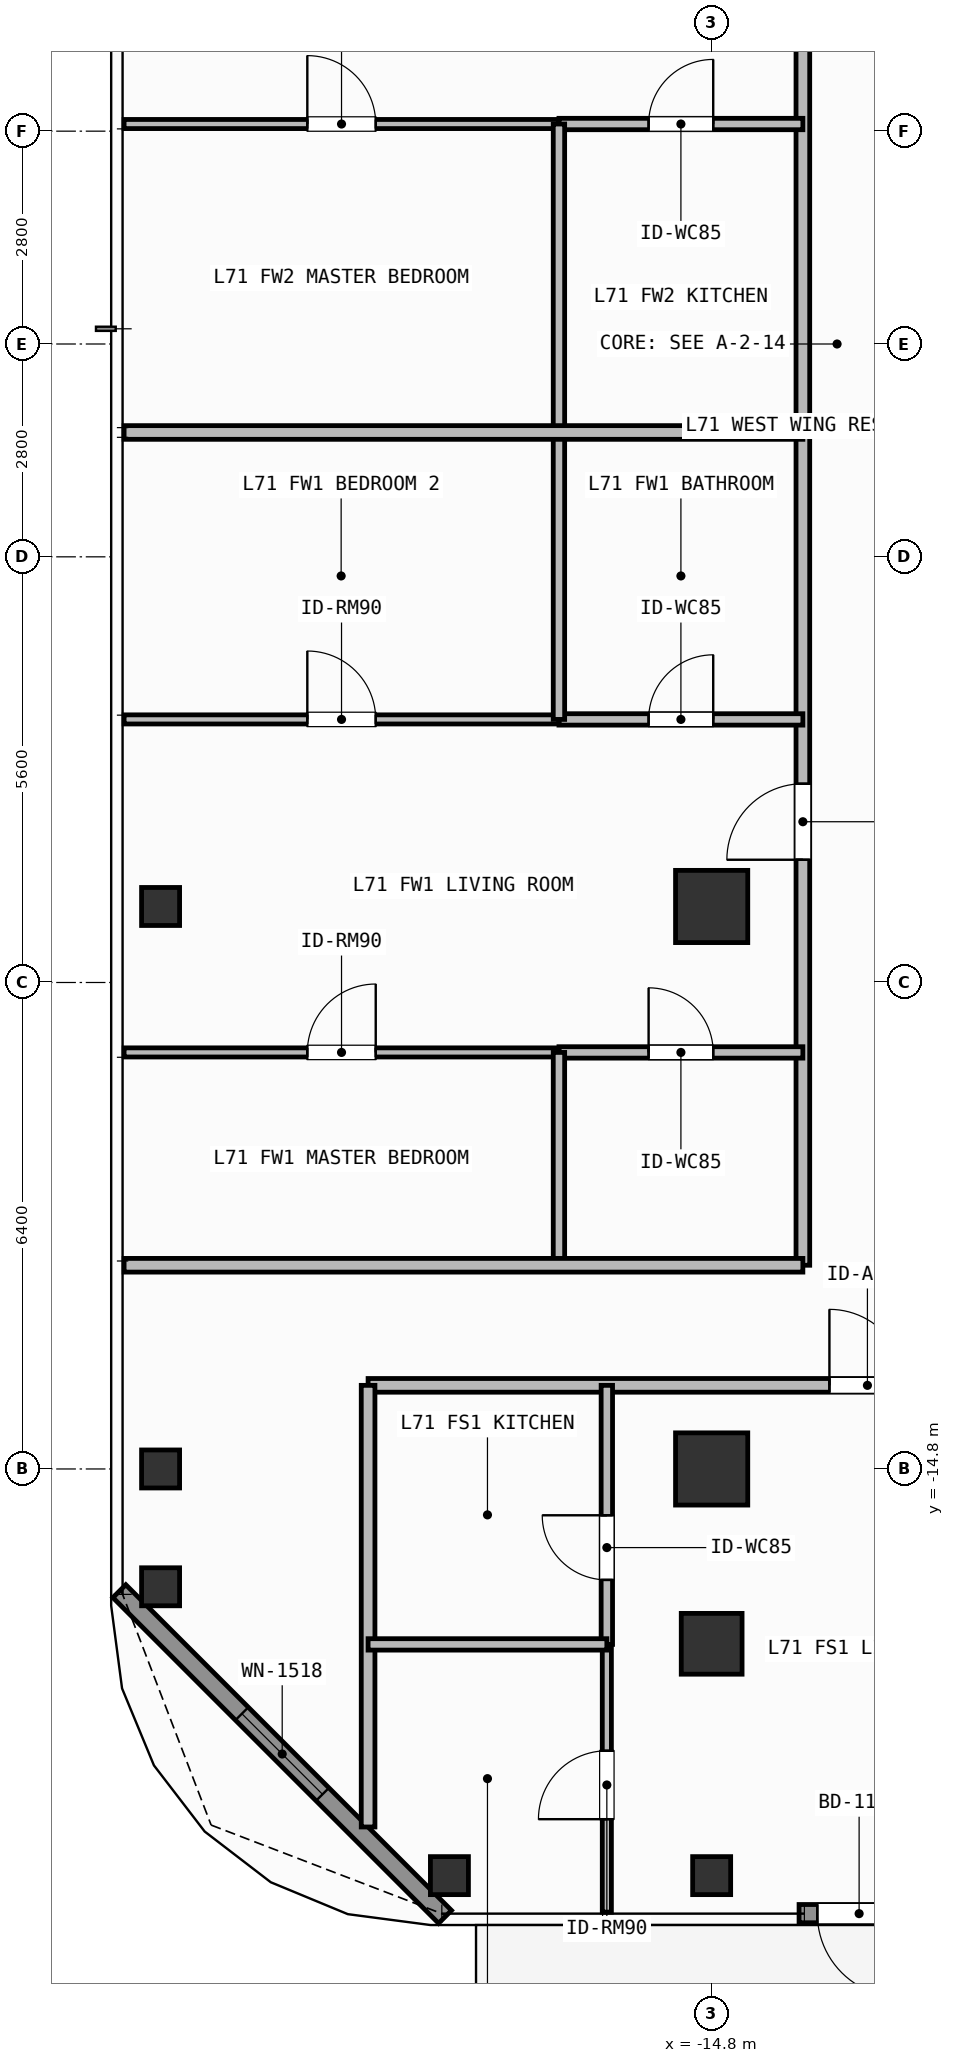
"""IFC4 building model, lengths in metres.
Left out: names, types, materials, properties, quantities, classifications, styles, units other than length and angle.
Written with IfcOpenShell. Run it as: python <this file> out.ifc"""

import sys

from ifc_helpers import new_model, si_unit, direction, frame, frame_2d, origin, origin_2d, place, context, subcontext, project, spatial, rectangle, hollow_rectangle, extrude, element, fill, save


model = new_model("IFC4")
c1 = context("Model", 3, precision=1e-05, world=origin(), true_north=direction((0.0, 1.0)))
c2 = subcontext(c1, "Body", "Model", "MODEL_VIEW")
j1 = project(units=[si_unit("LENGTHUNIT", "METRE"), si_unit("PLANEANGLEUNIT", "RADIAN")], contexts=[c1])
p1 = place(None, origin())
s1 = spatial("IfcSite", under=j1, at=p1, CompositionType="ELEMENT")
p2 = place(p1, origin())
s2 = spatial("IfcBuilding", under=s1, at=p2, CompositionType="ELEMENT")
p3 = place(p2, frame((0.0, 0.0, 289.8)))
s3 = spatial("IfcBuildingStorey", under=s2, at=p3, CompositionType="ELEMENT", Elevation=289.8)
for number, where, z_axis, x_axis in (
    (1, (-14.8, -14.8, 0.0), (0.0, 0.0, 1.0), (1.0, 0.0, 0.0)),
    (2, (-14.8, -7.4, 0.0), (0.0, 0.0, 1.0), (1.0, 0.0, 0.0)),
):
    element("IfcColumn", number, at=place(p3, frame(where, z_axis=z_axis, x_axis=x_axis)), inside=s3, PredefinedType="COLUMN", context=c2, shape_type="SweptSolid", body=[
        extrude(rectangle(XDim=0.95, YDim=0.95, at=origin_2d()), origin(), (0.0, 0.0, 1.0), 3.9),
    ])
p4 = place(p3, frame((-14.8, -17.1, 0.0), z_axis=(0.0, 0.0, 1.0), x_axis=(1.0, 0.0, 0.0)))
e3 = element("IfcColumn", 3, at=p4, inside=s3, PredefinedType="COLUMN", context=c2, shape_type="SweptSolid", body=[
    extrude(hollow_rectangle(XDim=0.8, YDim=0.8, WallThickness=0.036, at=origin_2d()), origin(), (0.0, 0.0, 1.0), 3.9),
])
for number, where, z_axis, x_axis in (
    (4, (-18.25, -20.15, 0.0), (0.0, 0.0, 1.0), (1.0, 0.0, 0.0)),
    (5, (-22.05, -16.35, 0.0), (0.0, 0.0, 1.0), (1.0, 0.0, 0.0)),
    (6, (-14.8, -20.15, 0.0), (0.0, 0.0, 1.0), (1.0, 0.0, 0.0)),
    (7, (-22.05, -14.8, 0.0), (0.0, 0.0, 1.0), (1.0, 0.0, 0.0)),
    (8, (-22.05, -7.4, 0.0), (0.0, 0.0, 1.0), (1.0, 0.0, 0.0)),
):
    element("IfcColumn", number, at=place(p3, frame(where, z_axis=z_axis, x_axis=x_axis)), inside=s3, PredefinedType="COLUMN", context=c2, shape_type="SweptSolid", body=[
        extrude(hollow_rectangle(XDim=0.5, YDim=0.5, WallThickness=0.025, at=origin_2d()), origin(), (0.0, 0.0, 1.0), 3.9),
    ])
p5 = place(p3, frame((-12.07, -20.65, 0.0), z_axis=(0.0, 0.0, 1.0), x_axis=(-1.0, 0.0, 0.0)))
e9 = element("IfcWall", 9, at=p5, inside=s3, PredefinedType="SOLIDWALL", context=c2, shape_type="SweptSolid", body=[
    extrude(rectangle(XDim=1.58, YDim=0.24, at=frame_2d((0.79, 0.0))), origin(), (0.0, 0.0, 1.0), 3.68),
])
p6 = place(p5, frame((0.24, 0.0, 0.0)))
e10 = element("IfcOpeningElement", 10, at=p6, cuts=e9, PredefinedType="OPENING", context=c2, shape_type="SweptSolid", body=[
    extrude(rectangle(XDim=1.1, YDim=2.2, at=frame_2d((0.55, 1.1))), frame((0.0, 0.13, 0.0), z_axis=(0.0, -1.0, 0.0), x_axis=(1.0, 0.0, 0.0)), (0.0, 0.0, 1.0), 0.26),
])
p7 = place(p3, frame((-18.308, -20.692, 0.0), z_axis=(0.0, 0.0, 1.0), x_axis=(-0.707106781187, 0.707106781187, 0.0)))
e11 = element("IfcWall", 11, at=p7, inside=s3, PredefinedType="SOLIDWALL", context=c2, shape_type="SweptSolid", body=[
    extrude(rectangle(XDim=6.059, YDim=0.24, at=frame_2d((3.03, 0.0))), origin(), (0.0, 0.0, 1.0), 3.68),
])
p8 = place(p7, frame((2.28, 0.0, 0.8)))
e12 = element("IfcOpeningElement", 12, at=p8, cuts=e11, PredefinedType="OPENING", context=c2, shape_type="SweptSolid", body=[
    extrude(rectangle(XDim=1.5, YDim=1.85, at=frame_2d((0.75, 0.925))), frame((0.0, 0.13, 0.0), z_axis=(0.0, -1.0, 0.0), x_axis=(1.0, 0.0, 0.0)), (0.0, 0.0, 1.0), 0.26),
])
p9 = place(p3, frame((-19.32, -13.7, 0.0), z_axis=(0.0, 0.0, 1.0), x_axis=(1.0, 0.0, 0.0)))
e13 = element("IfcWall", 13, at=p9, inside=s3, PredefinedType="PARTITIONING", context=c2, shape_type="SweptSolid", body=[
    extrude(rectangle(XDim=14.213, YDim=0.18, at=frame_2d((7.106, 0.0))), origin(), (0.0, 0.0, 1.0), 3.68),
])
p10 = place(p9, frame((6.069, 0.0, 0.0)))
e14 = element("IfcOpeningElement", 14, at=p10, cuts=e13, PredefinedType="OPENING", context=c2, shape_type="SweptSolid", body=[
    extrude(rectangle(XDim=1.0, YDim=2.2, at=frame_2d((0.5, 1.1))), frame((0.0, 0.1, 0.0), z_axis=(0.0, -1.0, 0.0), x_axis=(1.0, 0.0, 0.0)), (0.0, 0.0, 1.0), 0.2),
])
p11 = place(p3, frame((-16.179, -17.108, 0.0), z_axis=(0.0, 0.0, 1.0), x_axis=(0.0, 1.0, 0.0)))
e15 = element("IfcWall", 15, at=p11, inside=s3, PredefinedType="PARTITIONING", context=c2, shape_type="SweptSolid", body=[
    extrude(rectangle(XDim=3.408, YDim=0.15, at=frame_2d((1.704, 0.0))), origin(), (0.0, 0.0, 1.0), 3.68),
])
p12 = place(p11, frame((0.849, 0.0, 0.0)))
e16 = element("IfcOpeningElement", 16, at=p12, cuts=e15, PredefinedType="OPENING", context=c2, shape_type="SweptSolid", body=[
    extrude(rectangle(XDim=0.85, YDim=2.1, at=frame_2d((0.425, 1.05))), frame((0.0, 0.085, 0.0), z_axis=(0.0, -1.0, 0.0), x_axis=(1.0, 0.0, 0.0)), (0.0, 0.0, 1.0), 0.17),
])
p13 = place(p3, frame((-16.179, -20.63, 0.0), z_axis=(0.0, 0.0, 1.0), x_axis=(0.0, 1.0, 0.0)))
e17 = element("IfcWall", 17, at=p13, inside=s3, PredefinedType="PARTITIONING", context=c2, shape_type="SweptSolid", body=[
    extrude(rectangle(XDim=3.522, YDim=0.12, at=frame_2d((1.761, 0.0))), origin(), (0.0, 0.0, 1.0), 3.68),
])
p14 = place(p13, frame((1.222, 0.0, 0.0)))
e18 = element("IfcOpeningElement", 18, at=p14, cuts=e17, PredefinedType="OPENING", context=c2, shape_type="SweptSolid", body=[
    extrude(rectangle(XDim=0.9, YDim=2.1, at=frame_2d((0.45, 1.05))), frame((0.0, 0.07, 0.0), z_axis=(0.0, -1.0, 0.0), x_axis=(1.0, 0.0, 0.0)), (0.0, 0.0, 1.0), 0.14),
])
p15 = place(p3, frame((-13.6, -12.12, 0.0), z_axis=(0.0, 0.0, 1.0), x_axis=(0.0, 1.0, 0.0)))
e19 = element("IfcWall", 19, at=p15, inside=s3, PredefinedType="PARTITIONING", context=c2, shape_type="SweptSolid", body=[
    extrude(rectangle(XDim=10.956, YDim=0.18, at=frame_2d((5.478, 0.0))), origin(), (0.0, 0.0, 1.0), 3.68),
])
p16 = place(p15, frame((5.335, 0.0, 0.0)))
e20 = element("IfcOpeningElement", 20, at=p16, cuts=e19, PredefinedType="OPENING", context=c2, shape_type="SweptSolid", body=[
    extrude(rectangle(XDim=1.0, YDim=2.2, at=frame_2d((0.5, 1.1))), frame((0.0, 0.1, 0.0), z_axis=(0.0, -1.0, 0.0), x_axis=(1.0, 0.0, 0.0)), (0.0, 0.0, 1.0), 0.2),
])
p17 = place(p3, frame((-16.809, -4.939, 0.0), z_axis=(0.0, 0.0, 1.0), x_axis=(1.0, 0.0, 0.0)))
e21 = element("IfcWall", 21, at=p17, inside=s3, PredefinedType="PARTITIONING", context=c2, shape_type="SweptSolid", body=[
    extrude(rectangle(XDim=3.209, YDim=0.15, at=frame_2d((1.604, 0.0))), origin(), (0.0, 0.0, 1.0), 3.68),
])
p18 = place(p17, frame((1.179, 0.0, 0.0)))
e22 = element("IfcOpeningElement", 22, at=p18, cuts=e21, PredefinedType="OPENING", context=c2, shape_type="SweptSolid", body=[
    extrude(rectangle(XDim=0.85, YDim=2.1, at=frame_2d((0.425, 1.05))), frame((0.0, 0.085, 0.0), z_axis=(0.0, -1.0, 0.0), x_axis=(1.0, 0.0, 0.0)), (0.0, 0.0, 1.0), 0.17),
])
p19 = place(p3, frame((-16.809, -9.32, 0.0), z_axis=(0.0, 0.0, 1.0), x_axis=(1.0, 0.0, 0.0)))
e23 = element("IfcWall", 23, at=p19, inside=s3, PredefinedType="PARTITIONING", context=c2, shape_type="SweptSolid", body=[
    extrude(rectangle(XDim=3.209, YDim=0.15, at=frame_2d((1.604, 0.0))), origin(), (0.0, 0.0, 1.0), 3.68),
])
p20 = place(p19, frame((1.179, 0.0, 0.0)))
e24 = element("IfcOpeningElement", 24, at=p20, cuts=e23, PredefinedType="OPENING", context=c2, shape_type="SweptSolid", body=[
    extrude(rectangle(XDim=0.85, YDim=2.1, at=frame_2d((0.425, 1.05))), frame((0.0, 0.085, 0.0), z_axis=(0.0, -1.0, 0.0), x_axis=(1.0, 0.0, 0.0)), (0.0, 0.0, 1.0), 0.17),
])
p21 = place(p3, frame((-22.53, -9.32, 0.0), z_axis=(0.0, 0.0, 1.0), x_axis=(1.0, 0.0, 0.0)))
e25 = element("IfcWall", 25, at=p21, inside=s3, PredefinedType="PARTITIONING", context=c2, shape_type="SweptSolid", body=[
    extrude(rectangle(XDim=5.721, YDim=0.12, at=frame_2d((2.86, 0.0))), origin(), (0.0, 0.0, 1.0), 3.68),
])
p22 = place(p21, frame((2.41, 0.0, 0.0)))
e26 = element("IfcOpeningElement", 26, at=p22, cuts=e25, PredefinedType="OPENING", context=c2, shape_type="SweptSolid", body=[
    extrude(rectangle(XDim=0.9, YDim=2.1, at=frame_2d((0.45, 1.05))), frame((0.0, 0.07, 0.0), z_axis=(0.0, -1.0, 0.0), x_axis=(1.0, 0.0, 0.0)), (0.0, 0.0, 1.0), 0.14),
])
p23 = place(p3, frame((-22.53, -4.939, 0.0), z_axis=(0.0, 0.0, 1.0), x_axis=(1.0, 0.0, 0.0)))
e27 = element("IfcWall", 27, at=p23, inside=s3, PredefinedType="PARTITIONING", context=c2, shape_type="SweptSolid", body=[
    extrude(rectangle(XDim=5.721, YDim=0.12, at=frame_2d((2.86, 0.0))), origin(), (0.0, 0.0, 1.0), 3.68),
])
p24 = place(p23, frame((2.41, 0.0, 0.0)))
e28 = element("IfcOpeningElement", 28, at=p24, cuts=e27, PredefinedType="OPENING", context=c2, shape_type="SweptSolid", body=[
    extrude(rectangle(XDim=0.9, YDim=2.1, at=frame_2d((0.45, 1.05))), frame((0.0, 0.07, 0.0), z_axis=(0.0, -1.0, 0.0), x_axis=(1.0, 0.0, 0.0)), (0.0, 0.0, 1.0), 0.14),
])
p25 = place(p3, frame((-13.6, -1.164, 0.0), z_axis=(0.0, 0.0, 1.0), x_axis=(0.0, 1.0, 0.0)))
e29 = element("IfcWall", 29, at=p25, inside=s3, PredefinedType="PARTITIONING", context=c2, shape_type="SweptSolid", body=[
    extrude(rectangle(XDim=13.284, YDim=0.18, at=frame_2d((6.642, 0.0))), origin(), (0.0, 0.0, 1.0), 3.68),
])
p26 = place(p25, frame((6.767, 0.0, 0.0)))
e30 = element("IfcOpeningElement", 30, at=p26, cuts=e29, PredefinedType="OPENING", context=c2, shape_type="SweptSolid", body=[
    extrude(rectangle(XDim=1.0, YDim=2.2, at=frame_2d((0.5, 1.1))), frame((0.0, 0.1, 0.0), z_axis=(0.0, -1.0, 0.0), x_axis=(1.0, 0.0, 0.0)), (0.0, 0.0, 1.0), 0.2),
])
p27 = place(p3, frame((-16.809, 2.894, 0.0), z_axis=(0.0, 0.0, 1.0), x_axis=(1.0, 0.0, 0.0)))
e31 = element("IfcWall", 31, at=p27, inside=s3, PredefinedType="PARTITIONING", context=c2, shape_type="SweptSolid", body=[
    extrude(rectangle(XDim=3.209, YDim=0.15, at=frame_2d((1.604, 0.0))), origin(), (0.0, 0.0, 1.0), 3.68),
])
p28 = place(p27, frame((1.179, 0.0, 0.0)))
e32 = element("IfcOpeningElement", 32, at=p28, cuts=e31, PredefinedType="OPENING", context=c2, shape_type="SweptSolid", body=[
    extrude(rectangle(XDim=0.85, YDim=2.1, at=frame_2d((0.425, 1.05))), frame((0.0, 0.085, 0.0), z_axis=(0.0, -1.0, 0.0), x_axis=(1.0, 0.0, 0.0)), (0.0, 0.0, 1.0), 0.17),
])
p29 = place(p3, frame((-22.53, 2.894, 0.0), z_axis=(0.0, 0.0, 1.0), x_axis=(1.0, 0.0, 0.0)))
e33 = element("IfcWall", 33, at=p29, inside=s3, PredefinedType="PARTITIONING", context=c2, shape_type="SweptSolid", body=[
    extrude(rectangle(XDim=5.721, YDim=0.12, at=frame_2d((2.86, 0.0))), origin(), (0.0, 0.0, 1.0), 3.68),
])
p30 = place(p29, frame((2.41, 0.0, 0.0)))
e34 = element("IfcOpeningElement", 34, at=p30, cuts=e33, PredefinedType="OPENING", context=c2, shape_type="SweptSolid", body=[
    extrude(rectangle(XDim=0.9, YDim=2.1, at=frame_2d((0.45, 1.05))), frame((0.0, 0.07, 0.0), z_axis=(0.0, -1.0, 0.0), x_axis=(1.0, 0.0, 0.0)), (0.0, 0.0, 1.0), 0.14),
])
p31 = place(p3, frame((-19.32, -19.51, 0.0), z_axis=(0.0, 0.0, 1.0), x_axis=(0.0, 1.0, 0.0)))
e35 = element("IfcWall", 35, at=p31, inside=s3, PredefinedType="PARTITIONING", context=c2, shape_type="SweptSolid", body=[
    extrude(rectangle(XDim=5.81, YDim=0.18, at=frame_2d((2.905, 0.0))), origin(), (0.0, 0.0, 1.0), 3.68),
])
p32 = place(p3, frame((-19.32, -17.108, 0.0), z_axis=(0.0, 0.0, 1.0), x_axis=(1.0, 0.0, 0.0)))
e36 = element("IfcWall", 36, at=p32, inside=s3, PredefinedType="PARTITIONING", context=c2, shape_type="SweptSolid", body=[
    extrude(rectangle(XDim=3.141, YDim=0.15, at=frame_2d((1.571, 0.0))), origin(), (0.0, 0.0, 1.0), 3.68),
])
p33 = place(p3, frame((-16.809, -12.12, 0.0), z_axis=(0.0, 0.0, 1.0), x_axis=(0.0, 1.0, 0.0)))
e37 = element("IfcWall", 37, at=p33, inside=s3, PredefinedType="PARTITIONING", context=c2, shape_type="SweptSolid", body=[
    extrude(rectangle(XDim=2.8, YDim=0.15, at=frame_2d((1.4, 0.0))), origin(), (0.0, 0.0, 1.0), 3.68),
])
p34 = place(p3, frame((-16.809, -4.939, 0.0), z_axis=(0.0, 0.0, 1.0), x_axis=(0.0, 1.0, 0.0)))
e38 = element("IfcWall", 38, at=p34, inside=s3, PredefinedType="PARTITIONING", context=c2, shape_type="SweptSolid", body=[
    extrude(rectangle(XDim=3.775, YDim=0.15, at=frame_2d((1.887, 0.0))), origin(), (0.0, 0.0, 1.0), 3.68),
])
p35 = place(p3, frame((-16.809, -1.164, 0.0), z_axis=(0.0, 0.0, 1.0), x_axis=(0.0, 1.0, 0.0)))
e39 = element("IfcWall", 39, at=p35, inside=s3, PredefinedType="PARTITIONING", context=c2, shape_type="SweptSolid", body=[
    extrude(rectangle(XDim=4.058, YDim=0.15, at=frame_2d((2.029, 0.0))), origin(), (0.0, 0.0, 1.0), 3.68),
])
for number, where, z_axis, x_axis in (
    (40, (-22.53, -1.164, 0.0), (0.0, 0.0, 1.0), (1.0, 0.0, 0.0)),
    (41, (-22.53, -12.12, 0.0), (0.0, 0.0, 1.0), (1.0, 0.0, 0.0)),
):
    element("IfcWall", number, at=place(p3, frame(where, z_axis=z_axis, x_axis=x_axis)), inside=s3, PredefinedType="PARTITIONING", context=c2, shape_type="SweptSolid", body=[
        extrude(rectangle(XDim=8.93, YDim=0.18, at=frame_2d((4.465, 0.0))), origin(), (0.0, 0.0, 1.0), 3.68),
    ])
p36 = place(p6, origin())
e42 = element("IfcDoor", 42, at=p36, inside=s3, OperationType="SINGLE_SWING_LEFT", PredefinedType="DOOR", context=c2, shape_type="SweptSolid", body=[
    extrude(rectangle(XDim=1.1, YDim=2.2, at=frame_2d((0.55, 1.1))), frame((0.0, 0.025, 0.0), z_axis=(0.0, -1.0, 0.0), x_axis=(1.0, 0.0, 0.0)), (0.0, 0.0, 1.0), 0.05),
])
fill(e10, e42)
p37 = place(p8, origin())
e43 = element("IfcWindow", 43, at=p37, inside=s3, PartitioningType="SINGLE_PANEL", PredefinedType="WINDOW", context=c2, shape_type="SweptSolid", body=[
    extrude(rectangle(XDim=1.5, YDim=1.85, at=frame_2d((0.75, 0.925))), frame((0.0, 0.03, 0.0), z_axis=(0.0, -1.0, 0.0), x_axis=(1.0, 0.0, 0.0)), (0.0, 0.0, 1.0), 0.06),
])
fill(e12, e43)
p38 = place(p10, origin())
e44 = element("IfcDoor", 44, at=p38, inside=s3, OperationType="SINGLE_SWING_LEFT", PredefinedType="DOOR", context=c2, shape_type="SweptSolid", body=[
    extrude(rectangle(XDim=1.0, YDim=2.2, at=frame_2d((0.5, 1.1))), frame((0.0, 0.025, 0.0), z_axis=(0.0, -1.0, 0.0), x_axis=(1.0, 0.0, 0.0)), (0.0, 0.0, 1.0), 0.05),
])
fill(e14, e44)
p39 = place(p12, origin())
e45 = element("IfcDoor", 45, at=p39, inside=s3, OperationType="SINGLE_SWING_RIGHT", PredefinedType="DOOR", context=c2, shape_type="SweptSolid", body=[
    extrude(rectangle(XDim=0.85, YDim=2.1, at=frame_2d((0.425, 1.05))), frame((0.0, 0.025, 0.0), z_axis=(0.0, -1.0, 0.0), x_axis=(1.0, 0.0, 0.0)), (0.0, 0.0, 1.0), 0.05),
])
fill(e16, e45)
p40 = place(p14, origin())
e46 = element("IfcDoor", 46, at=p40, inside=s3, OperationType="SINGLE_SWING_LEFT", PredefinedType="DOOR", context=c2, shape_type="SweptSolid", body=[
    extrude(rectangle(XDim=0.9, YDim=2.1, at=frame_2d((0.45, 1.05))), frame((0.0, 0.025, 0.0), z_axis=(0.0, -1.0, 0.0), x_axis=(1.0, 0.0, 0.0)), (0.0, 0.0, 1.0), 0.05),
])
fill(e18, e46)
p41 = place(p16, origin())
e47 = element("IfcDoor", 47, at=p41, inside=s3, OperationType="SINGLE_SWING_LEFT", PredefinedType="DOOR", context=c2, shape_type="SweptSolid", body=[
    extrude(rectangle(XDim=1.0, YDim=2.2, at=frame_2d((0.5, 1.1))), frame((0.0, 0.025, 0.0), z_axis=(0.0, -1.0, 0.0), x_axis=(1.0, 0.0, 0.0)), (0.0, 0.0, 1.0), 0.05),
])
fill(e20, e47)
p42 = place(p18, origin())
e48 = element("IfcDoor", 48, at=p42, inside=s3, OperationType="SINGLE_SWING_RIGHT", PredefinedType="DOOR", context=c2, shape_type="SweptSolid", body=[
    extrude(rectangle(XDim=0.85, YDim=2.1, at=frame_2d((0.425, 1.05))), frame((0.0, 0.025, 0.0), z_axis=(0.0, -1.0, 0.0), x_axis=(1.0, 0.0, 0.0)), (0.0, 0.0, 1.0), 0.05),
])
fill(e22, e48)
p43 = place(p20, origin())
e49 = element("IfcDoor", 49, at=p43, inside=s3, OperationType="SINGLE_SWING_LEFT", PredefinedType="DOOR", context=c2, shape_type="SweptSolid", body=[
    extrude(rectangle(XDim=0.85, YDim=2.1, at=frame_2d((0.425, 1.05))), frame((0.0, 0.025, 0.0), z_axis=(0.0, -1.0, 0.0), x_axis=(1.0, 0.0, 0.0)), (0.0, 0.0, 1.0), 0.05),
])
fill(e24, e49)
p44 = place(p22, origin())
e50 = element("IfcDoor", 50, at=p44, inside=s3, OperationType="SINGLE_SWING_RIGHT", PredefinedType="DOOR", context=c2, shape_type="SweptSolid", body=[
    extrude(rectangle(XDim=0.9, YDim=2.1, at=frame_2d((0.45, 1.05))), frame((0.0, 0.025, 0.0), z_axis=(0.0, -1.0, 0.0), x_axis=(1.0, 0.0, 0.0)), (0.0, 0.0, 1.0), 0.05),
])
fill(e26, e50)
p45 = place(p24, origin())
e51 = element("IfcDoor", 51, at=p45, inside=s3, OperationType="SINGLE_SWING_LEFT", PredefinedType="DOOR", context=c2, shape_type="SweptSolid", body=[
    extrude(rectangle(XDim=0.9, YDim=2.1, at=frame_2d((0.45, 1.05))), frame((0.0, 0.025, 0.0), z_axis=(0.0, -1.0, 0.0), x_axis=(1.0, 0.0, 0.0)), (0.0, 0.0, 1.0), 0.05),
])
fill(e28, e51)
p46 = place(p28, origin())
e52 = element("IfcDoor", 52, at=p46, inside=s3, OperationType="SINGLE_SWING_RIGHT", PredefinedType="DOOR", context=c2, shape_type="SweptSolid", body=[
    extrude(rectangle(XDim=0.85, YDim=2.1, at=frame_2d((0.425, 1.05))), frame((0.0, 0.025, 0.0), z_axis=(0.0, -1.0, 0.0), x_axis=(1.0, 0.0, 0.0)), (0.0, 0.0, 1.0), 0.05),
])
fill(e32, e52)
p47 = place(p30, origin())
e53 = element("IfcDoor", 53, at=p47, inside=s3, OperationType="SINGLE_SWING_LEFT", PredefinedType="DOOR", context=c2, shape_type="SweptSolid", body=[
    extrude(rectangle(XDim=0.9, YDim=2.1, at=frame_2d((0.45, 1.05))), frame((0.0, 0.025, 0.0), z_axis=(0.0, -1.0, 0.0), x_axis=(1.0, 0.0, 0.0)), (0.0, 0.0, 1.0), 0.05),
])
fill(e34, e53)
save(model, sys.argv[1])
